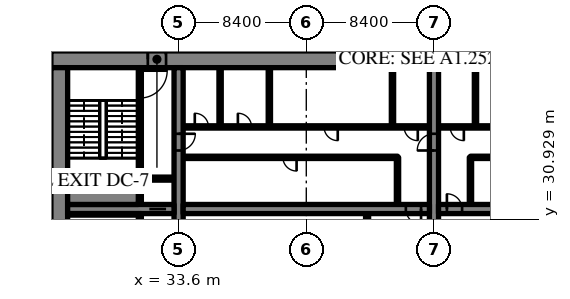
"""IFC4 building model, lengths in metres.
Left out: names, types, materials, properties, quantities, classifications, styles, units other than length and angle.
Written with IfcOpenShell. Run it as: python <this file> out.ifc"""

import sys

from ifc_helpers import new_model, si_unit, direction, frame, frame_2d, origin, place, context, subcontext, project, spatial, rectangle, extrude, source, transform, mapped, element, fill, save


model = new_model("IFC4")
c1 = context("Model", 3, precision=1e-05, world=origin(), true_north=direction((0.0, 1.0)))
c2 = subcontext(c1, "Body", "Model", "MODEL_VIEW")
j1 = project(units=[si_unit("LENGTHUNIT", "METRE"), si_unit("PLANEANGLEUNIT", "RADIAN")], contexts=[c1])
p1 = place(None, origin())
s1 = spatial("IfcSite", under=j1, at=p1, CompositionType="ELEMENT")
p2 = place(p1, origin())
s2 = spatial("IfcBuilding", under=s1, at=p2, CompositionType="ELEMENT")
p3 = place(p2, origin())
s3 = spatial("IfcBuildingStorey", under=s2, at=p3, CompositionType="ELEMENT", Elevation=0.0)
m1 = source(origin(), c2, "Body", "SweptSolid", [
    extrude(rectangle(XDim=50.4, YDim=1.1, at=frame_2d((25.2, 0.0))), origin(), (0.0, 0.0, 1.0), 5.72),
])
p4 = place(p3, frame((25.2, 41.45, 0.0), z_axis=(0.0, 0.0, 1.0), x_axis=(1.0, 0.0, 0.0)))
e1 = element("IfcWall", 1, at=p4, inside=s3, PredefinedType="SHEAR", context=c2, shape_type="MappedRepresentation", body=[
    mapped(m1, transform((0.0, 0.0, 0.0), scale=1.0)),
])
m2 = source(origin(), c2, "Body", "SweptSolid", [
    extrude(rectangle(XDim=1.2, YDim=2.1, at=frame_2d((0.6, 1.05))), frame((0.0, 0.56, 0.0), z_axis=(0.0, -1.0, 0.0), x_axis=(1.0, 0.0, 0.0)), (0.0, 0.0, 1.0), 1.12),
])
p5 = place(p4, frame((6.375, 0.0, 0.0)))
e2 = element("IfcOpeningElement", 2, at=p5, cuts=e1, PredefinedType="OPENING", context=c2, shape_type="MappedRepresentation", body=[
    mapped(m2, transform((0.0, 0.0, 0.0), scale=1.0)),
])
p6 = place(p4, frame((47.625, 0.0, 0.0)))
e3 = element("IfcOpeningElement", 3, at=p6, cuts=e1, PredefinedType="OPENING", context=c2, shape_type="MappedRepresentation", body=[
    mapped(m2, transform((0.0, 0.0, 0.0), scale=1.0)),
])
m3 = source(origin(), c2, "Body", "SweptSolid", [
    extrude(rectangle(XDim=17.8, YDim=1.1, at=frame_2d((8.9, 0.0))), origin(), (0.0, 0.0, 1.0), 5.72),
])
p7 = place(p3, frame((25.75, 23.1, 0.0), z_axis=(0.0, 0.0, 1.0), x_axis=(0.0, 1.0, 0.0)))
e4 = element("IfcWall", 4, at=p7, inside=s3, PredefinedType="SHEAR", context=c2, shape_type="MappedRepresentation", body=[
    mapped(m3, transform((0.0, 0.0, 0.0), scale=1.0)),
])
m4 = source(origin(), c2, "Body", "SweptSolid", [
    extrude(rectangle(XDim=17.8, YDim=0.6, at=frame_2d((8.9, 0.0))), origin(), (0.0, 0.0, 1.0), 5.72),
])
p8 = place(p3, frame((33.6, 23.1, 0.0), z_axis=(0.0, 0.0, 1.0), x_axis=(0.0, 1.0, 0.0)))
e5 = element("IfcWall", 5, at=p8, inside=s3, PredefinedType="SHEAR", context=c2, shape_type="MappedRepresentation", body=[
    mapped(m4, transform((0.0, 0.0, 0.0), scale=1.0)),
])
m5 = source(origin(), c2, "Body", "SweptSolid", [
    extrude(rectangle(XDim=1.1, YDim=2.1, at=frame_2d((0.55, 1.05))), frame((0.0, 0.31, 0.0), z_axis=(0.0, -1.0, 0.0), x_axis=(1.0, 0.0, 0.0)), (0.0, 0.0, 1.0), 0.62),
])
p9 = place(p8, frame((12.35, 0.0, 0.0)))
e6 = element("IfcOpeningElement", 6, at=p9, cuts=e5, PredefinedType="OPENING", context=c2, shape_type="MappedRepresentation", body=[
    mapped(m5, transform((0.0, 0.0, 0.0), scale=1.0)),
])
p10 = place(p3, frame((50.4, 23.1, 0.0), z_axis=(0.0, 0.0, 1.0), x_axis=(0.0, 1.0, 0.0)))
e7 = element("IfcWall", 7, at=p10, inside=s3, PredefinedType="SHEAR", context=c2, shape_type="MappedRepresentation", body=[
    mapped(m4, transform((0.0, 0.0, 0.0), scale=1.0)),
])
p11 = place(p10, frame((12.35, 0.0, 0.0)))
e8 = element("IfcOpeningElement", 8, at=p11, cuts=e7, PredefinedType="OPENING", context=c2, shape_type="MappedRepresentation", body=[
    mapped(m5, transform((0.0, 0.0, 0.0), scale=1.0)),
])
m6 = source(origin(), c2, "Body", "SweptSolid", [
    extrude(rectangle(XDim=7.0, YDim=0.6, at=frame_2d((3.5, 0.0))), origin(), (0.0, 0.0, 1.0), 5.72),
])
p12 = place(p3, frame((26.3, 31.6, 0.0), z_axis=(0.0, 0.0, 1.0), x_axis=(1.0, 0.0, 0.0)))
e9 = element("IfcWall", 9, at=p12, inside=s3, PredefinedType="SHEAR", context=c2, shape_type="MappedRepresentation", body=[
    mapped(m6, transform((0.0, 0.0, 0.0), scale=1.0)),
])
p13 = place(p12, frame((5.375, 0.0, 0.0)))
e10 = element("IfcOpeningElement", 10, at=p13, cuts=e9, PredefinedType="OPENING", context=c2, shape_type="MappedRepresentation", body=[
    mapped(m5, transform((0.0, 0.0, 0.0), scale=1.0)),
])
m7 = source(origin(), c2, "Body", "SweptSolid", [
    extrude(rectangle(XDim=16.2, YDim=0.6, at=frame_2d((8.1, 0.0))), origin(), (0.0, 0.0, 1.0), 5.72),
])
p14 = place(p3, frame((33.9, 31.6, 0.0), z_axis=(0.0, 0.0, 1.0), x_axis=(1.0, 0.0, 0.0)))
e11 = element("IfcWall", 11, at=p14, inside=s3, PredefinedType="SHEAR", context=c2, shape_type="MappedRepresentation", body=[
    mapped(m7, transform((0.0, 0.0, 0.0), scale=1.0)),
])
m8 = source(origin(), c2, "Body", "SweptSolid", [
    extrude(rectangle(XDim=1.0, YDim=2.1, at=frame_2d((0.5, 1.05))), frame((0.0, 0.31, 0.0), z_axis=(0.0, -1.0, 0.0), x_axis=(1.0, 0.0, 0.0)), (0.0, 0.0, 1.0), 0.62),
])
p15 = place(p14, frame((14.65, 0.0, 0.0)))
e12 = element("IfcOpeningElement", 12, at=p15, cuts=e11, PredefinedType="OPENING", context=c2, shape_type="MappedRepresentation", body=[
    mapped(m8, transform((0.0, 0.0, 0.0), scale=1.0)),
])
m9 = source(origin(), c2, "Body", "SweptSolid", [
    extrude(rectangle(XDim=16.2, YDim=0.6, at=frame_2d((8.1, 0.0))), origin(), (0.0, 0.0, 1.0), 5.72),
])
p16 = place(p3, frame((50.7, 31.6, 0.0), z_axis=(0.0, 0.0, 1.0), x_axis=(1.0, 0.0, 0.0)))
e13 = element("IfcWall", 13, at=p16, inside=s3, PredefinedType="SHEAR", context=c2, shape_type="MappedRepresentation", body=[
    mapped(m9, transform((0.0, 0.0, 0.0), scale=1.0)),
])
p17 = place(p16, frame((0.55, 0.0, 0.0)))
e14 = element("IfcOpeningElement", 14, at=p17, cuts=e13, PredefinedType="OPENING", context=c2, shape_type="MappedRepresentation", body=[
    mapped(m8, transform((0.0, 0.0, 0.0), scale=1.0)),
])
m10 = source(origin(), c2, "Body", "SweptSolid", [
    extrude(rectangle(XDim=2.5, YDim=0.2, at=frame_2d((1.25, 0.0))), origin(), (0.0, 0.0, 1.0), 5.72),
])
p18 = place(p3, frame((46.0, 28.8, 0.0), z_axis=(0.0, 0.0, 1.0), x_axis=(0.0, 1.0, 0.0)))
e15 = element("IfcWall", 15, at=p18, inside=s3, PredefinedType="SOLIDWALL", context=c2, shape_type="MappedRepresentation", body=[
    mapped(m10, transform((0.0, 0.0, 0.0), scale=1.0)),
])
m11 = source(origin(), c2, "Body", "SweptSolid", [
    extrude(rectangle(XDim=3.1, YDim=0.15, at=frame_2d((1.55, 0.0))), origin(), (0.0, 0.0, 1.0), 5.72),
])
p19 = place(p3, frame((48.0, 31.9, 0.0), z_axis=(0.0, 0.0, 1.0), x_axis=(0.0, 1.0, 0.0)))
e16 = element("IfcWall", 16, at=p19, inside=s3, PredefinedType="PARTITIONING", context=c2, shape_type="MappedRepresentation", body=[
    mapped(m11, transform((0.0, 0.0, 0.0), scale=1.0)),
])
m12 = source(origin(), c2, "Body", "SweptSolid", [
    extrude(rectangle(XDim=14.1, YDim=0.15, at=frame_2d((7.05, 0.0))), origin(), (0.0, 0.0, 1.0), 5.72),
])
p20 = place(p3, frame((33.9, 35.0, 0.0), z_axis=(0.0, 0.0, 1.0), x_axis=(1.0, 0.0, 0.0)))
e17 = element("IfcWall", 17, at=p20, inside=s3, PredefinedType="PARTITIONING", context=c2, shape_type="MappedRepresentation", body=[
    mapped(m12, transform((0.0, 0.0, 0.0), scale=1.0)),
])
m13 = source(origin(), c2, "Body", "SweptSolid", [
    extrude(rectangle(XDim=0.9, YDim=2.1, at=frame_2d((0.45, 1.05))), frame((0.0, 0.085, 0.0), z_axis=(0.0, -1.0, 0.0), x_axis=(1.0, 0.0, 0.0)), (0.0, 0.0, 1.0), 0.17),
])
p21 = place(p20, frame((6.562, 0.0, 0.0)))
e18 = element("IfcOpeningElement", 18, at=p21, cuts=e17, PredefinedType="OPENING", context=c2, shape_type="MappedRepresentation", body=[
    mapped(m13, transform((0.0, 0.0, 0.0), scale=1.0)),
])
m14 = source(origin(), c2, "Body", "SweptSolid", [
    extrude(rectangle(XDim=16.2, YDim=0.15, at=frame_2d((8.1, 0.0))), origin(), (0.0, 0.0, 1.0), 5.72),
])
p22 = place(p3, frame((33.9, 37.0, 0.0), z_axis=(0.0, 0.0, 1.0), x_axis=(1.0, 0.0, 0.0)))
e19 = element("IfcWall", 19, at=p22, inside=s3, PredefinedType="PARTITIONING", context=c2, shape_type="MappedRepresentation", body=[
    mapped(m14, transform((0.0, 0.0, 0.0), scale=1.0)),
])
p23 = place(p22, frame((0.765, 0.0, 0.0)))
e20 = element("IfcOpeningElement", 20, at=p23, cuts=e19, PredefinedType="OPENING", context=c2, shape_type="MappedRepresentation", body=[
    mapped(m13, transform((0.0, 0.0, 0.0), scale=1.0)),
])
p24 = place(p22, frame((3.6, 0.0, 0.0)))
e21 = element("IfcOpeningElement", 21, at=p24, cuts=e19, PredefinedType="OPENING", context=c2, shape_type="MappedRepresentation", body=[
    mapped(m13, transform((0.0, 0.0, 0.0), scale=1.0)),
])
p25 = place(p22, frame((9.27, 0.0, 0.0)))
e22 = element("IfcOpeningElement", 22, at=p25, cuts=e19, PredefinedType="OPENING", context=c2, shape_type="MappedRepresentation", body=[
    mapped(m13, transform((0.0, 0.0, 0.0), scale=1.0)),
])
p26 = place(p22, frame((14.535, 0.0, 0.0)))
e23 = element("IfcOpeningElement", 23, at=p26, cuts=e19, PredefinedType="OPENING", context=c2, shape_type="MappedRepresentation", body=[
    mapped(m13, transform((0.0, 0.0, 0.0), scale=1.0)),
])
m15 = source(origin(), c2, "Body", "SweptSolid", [
    extrude(rectangle(XDim=3.9, YDim=0.15, at=frame_2d((1.95, 0.0))), origin(), (0.0, 0.0, 1.0), 5.72),
])
for number, where, z_axis, x_axis in (
    (24, (36.33, 37.0, 0.0), (0.0, 0.0, 1.0), (0.0, 1.0, 0.0)),
    (25, (39.57, 37.0, 0.0), (0.0, 0.0, 1.0), (0.0, 1.0, 0.0)),
    (26, (47.67, 37.0, 0.0), (0.0, 0.0, 1.0), (0.0, 1.0, 0.0)),
):
    element("IfcWall", number, at=place(p3, frame(where, z_axis=z_axis, x_axis=x_axis)), inside=s3, PredefinedType="PARTITIONING", context=c2, shape_type="MappedRepresentation", body=[
        mapped(m15, transform((0.0, 0.0, 0.0), scale=1.0)),
    ])
p27 = place(p3, frame((52.8, 31.9, 0.0), z_axis=(0.0, 0.0, 1.0), x_axis=(0.0, 1.0, 0.0)))
e27 = element("IfcWall", 27, at=p27, inside=s3, PredefinedType="PARTITIONING", context=c2, shape_type="MappedRepresentation", body=[
    mapped(m11, transform((0.0, 0.0, 0.0), scale=1.0)),
])
m16 = source(origin(), c2, "Body", "SweptSolid", [
    extrude(rectangle(XDim=14.1, YDim=0.15, at=frame_2d((7.05, 0.0))), origin(), (0.0, 0.0, 1.0), 5.72),
])
p28 = place(p3, frame((66.9, 35.0, 0.0), z_axis=(0.0, 0.0, 1.0), x_axis=(-1.0, 0.0, 0.0)))
e28 = element("IfcWall", 28, at=p28, inside=s3, PredefinedType="PARTITIONING", context=c2, shape_type="MappedRepresentation", body=[
    mapped(m16, transform((0.0, 0.0, 0.0), scale=1.0)),
])
p29 = place(p28, frame((3.407, 0.0, 0.0)))
e29 = element("IfcOpeningElement", 29, at=p29, cuts=e28, PredefinedType="OPENING", context=c2, shape_type="MappedRepresentation", body=[
    mapped(m13, transform((0.0, 0.0, 0.0), scale=1.0)),
])
p30 = place(p28, frame((10.419, 0.0, 0.0)))
e30 = element("IfcOpeningElement", 30, at=p30, cuts=e28, PredefinedType="OPENING", context=c2, shape_type="MappedRepresentation", body=[
    mapped(m13, transform((0.0, 0.0, 0.0), scale=1.0)),
])
m17 = source(origin(), c2, "Body", "SweptSolid", [
    extrude(rectangle(XDim=16.2, YDim=0.15, at=frame_2d((8.1, 0.0))), origin(), (0.0, 0.0, 1.0), 5.72),
])
p31 = place(p3, frame((66.9, 37.0, 0.0), z_axis=(0.0, 0.0, 1.0), x_axis=(-1.0, 0.0, 0.0)))
e31 = element("IfcWall", 31, at=p31, inside=s3, PredefinedType="PARTITIONING", context=c2, shape_type="MappedRepresentation", body=[
    mapped(m17, transform((0.0, 0.0, 0.0), scale=1.0)),
])
p32 = place(p31, frame((6.435, 0.0, 0.0)))
e32 = element("IfcOpeningElement", 32, at=p32, cuts=e31, PredefinedType="OPENING", context=c2, shape_type="MappedRepresentation", body=[
    mapped(m13, transform((0.0, 0.0, 0.0), scale=1.0)),
])
p33 = place(p31, frame((14.535, 0.0, 0.0)))
e33 = element("IfcOpeningElement", 33, at=p33, cuts=e31, PredefinedType="OPENING", context=c2, shape_type="MappedRepresentation", body=[
    mapped(m13, transform((0.0, 0.0, 0.0), scale=1.0)),
])
p34 = place(p3, frame((53.13, 37.0, 0.0), z_axis=(0.0, 0.0, 1.0), x_axis=(0.0, 1.0, 0.0)))
e34 = element("IfcWall", 34, at=p34, inside=s3, PredefinedType="PARTITIONING", context=c2, shape_type="MappedRepresentation", body=[
    mapped(m15, transform((0.0, 0.0, 0.0), scale=1.0)),
])
m18 = source(origin(), c2, "Body", "SweptSolid", [
    extrude(rectangle(XDim=8.2, YDim=0.2, at=frame_2d((4.1, 0.0))), origin(), (0.0, 0.0, 1.0), 5.72),
])
p35 = place(p3, frame((31.05, 23.1, 0.0), z_axis=(0.0, 0.0, 1.0), x_axis=(0.0, 1.0, 0.0)))
e35 = element("IfcWall", 35, at=p35, inside=s3, PredefinedType="SOLIDWALL", context=c2, shape_type="MappedRepresentation", body=[
    mapped(m18, transform((0.0, 0.0, 0.0), scale=1.0)),
])
m19 = source(origin(), c2, "Body", "SweptSolid", [
    extrude(rectangle(XDim=1.2, YDim=2.1, at=frame_2d((0.6, 1.05))), frame((0.0, 0.11, 0.0), z_axis=(0.0, -1.0, 0.0), x_axis=(1.0, 0.0, 0.0)), (0.0, 0.0, 1.0), 0.22),
])
p36 = place(p35, frame((6.4, 0.0, 0.0)))
e36 = element("IfcOpeningElement", 36, at=p36, cuts=e35, PredefinedType="OPENING", context=c2, shape_type="MappedRepresentation", body=[
    mapped(m19, transform((0.0, 0.0, 0.0), scale=1.0)),
])
m20 = source(origin(), c2, "Body", "SweptSolid", [
    extrude(rectangle(XDim=1.7, YDim=0.2, at=frame_2d((0.85, 0.0))), origin(), (0.0, 0.0, 1.0), 5.72),
])
p37 = place(p3, frame((31.05, 31.9, 0.0), z_axis=(0.0, 0.0, 1.0), x_axis=(0.0, 1.0, 0.0)))
e37 = element("IfcWall", 37, at=p37, inside=s3, PredefinedType="SOLIDWALL", context=c2, shape_type="MappedRepresentation", body=[
    mapped(m20, transform((0.0, 0.0, 0.0), scale=1.0)),
])
m21 = source(origin(), c2, "Body", "SweptSolid", [
    extrude(rectangle(XDim=2.15, YDim=0.2, at=frame_2d((1.075, 0.0))), origin(), (0.0, 0.0, 1.0), 5.72),
])
p38 = place(p3, frame((31.15, 33.6, 0.0), z_axis=(0.0, 0.0, 1.0), x_axis=(1.0, 0.0, 0.0)))
e38 = element("IfcWall", 38, at=p38, inside=s3, PredefinedType="SOLIDWALL", context=c2, shape_type="MappedRepresentation", body=[
    mapped(m21, transform((0.0, 0.0, 0.0), scale=1.0)),
])
m22 = source(origin(), c2, "Body", "SweptSolid", [
    extrude(rectangle(XDim=7.3, YDim=0.2, at=frame_2d((3.65, 0.0))), origin(), (0.0, 0.0, 1.0), 5.72),
])
p39 = place(p3, frame((31.05, 33.6, 0.0), z_axis=(0.0, 0.0, 1.0), x_axis=(0.0, 1.0, 0.0)))
e39 = element("IfcWall", 39, at=p39, inside=s3, PredefinedType="SOLIDWALL", context=c2, shape_type="MappedRepresentation", body=[
    mapped(m22, transform((0.0, 0.0, 0.0), scale=1.0)),
])
m23 = source(origin(), c2, "Body", "SweptSolid", [
    extrude(rectangle(XDim=1.8, YDim=2.1, at=frame_2d((0.9, 1.05))), frame((0.0, 0.11, 0.0), z_axis=(0.0, -1.0, 0.0), x_axis=(1.0, 0.0, 0.0)), (0.0, 0.0, 1.0), 0.22),
])
p40 = place(p39, frame((5.3, 0.0, 0.0)))
e40 = element("IfcOpeningElement", 40, at=p40, cuts=e39, PredefinedType="OPENING", context=c2, shape_type="MappedRepresentation", body=[
    mapped(m23, transform((0.0, 0.0, 0.0), scale=1.0)),
])
m24 = source(origin(), c2, "Body", "SweptSolid", [
    extrude(rectangle(XDim=4.65, YDim=0.1, at=frame_2d((2.325, 0.0))), origin(), (0.0, 0.0, 1.0), 5.72),
])
p41 = place(p3, frame((26.3, 31.25, 0.0), z_axis=(0.0, 0.0, 1.0), x_axis=(1.0, 0.0, 0.0)))
e41 = element("IfcWall", 41, at=p41, inside=s3, PredefinedType="SOLIDWALL", context=c2, shape_type="MappedRepresentation", body=[
    mapped(m24, transform((0.0, 0.0, 0.0), scale=1.0)),
])
m25 = source(origin(), c2, "Body", "SweptSolid", [
    extrude(rectangle(XDim=4.65, YDim=0.9, at=frame_2d((2.325, 0.0))), origin(), (0.0, 0.0, 1.0), 5.72),
])
p42 = place(p3, frame((26.3, 32.35, 0.0), z_axis=(0.0, 0.0, 1.0), x_axis=(1.0, 0.0, 0.0)))
e42 = element("IfcWall", 42, at=p42, inside=s3, PredefinedType="SOLIDWALL", context=c2, shape_type="MappedRepresentation", body=[
    mapped(m25, transform((0.0, 0.0, 0.0), scale=1.0)),
])
m26 = source(origin(), c2, "Body", "SweptSolid", [
    extrude(rectangle(XDim=1.0, YDim=2.1, at=frame_2d((0.5, 1.05))), frame((0.0, 0.025, 0.0), z_axis=(0.0, -1.0, 0.0), x_axis=(1.0, 0.0, 0.0)), (0.0, 0.0, 1.0), 0.05),
])
p43 = place(p15, origin())
e43 = element("IfcDoor", 43, at=p43, inside=s3, OperationType="SINGLE_SWING_RIGHT", PredefinedType="DOOR", context=c2, shape_type="MappedRepresentation", body=[
    mapped(m26, transform((0.0, 0.0, 0.0), scale=1.0)),
])
fill(e12, e43)
m27 = source(origin(), c2, "Body", "SweptSolid", [
    extrude(rectangle(XDim=0.9, YDim=2.1, at=frame_2d((0.45, 1.05))), frame((0.0, 0.025, 0.0), z_axis=(0.0, -1.0, 0.0), x_axis=(1.0, 0.0, 0.0)), (0.0, 0.0, 1.0), 0.05),
])
p44 = place(p21, origin())
e44 = element("IfcDoor", 44, at=p44, inside=s3, OperationType="SINGLE_SWING_RIGHT", PredefinedType="DOOR", context=c2, shape_type="MappedRepresentation", body=[
    mapped(m27, transform((0.0, 0.0, 0.0), scale=1.0)),
])
fill(e18, e44)
p45 = place(p23, origin())
e45 = element("IfcDoor", 45, at=p45, inside=s3, OperationType="SINGLE_SWING_LEFT", PredefinedType="DOOR", context=c2, shape_type="MappedRepresentation", body=[
    mapped(m27, transform((0.0, 0.0, 0.0), scale=1.0)),
])
fill(e20, e45)
p46 = place(p24, origin())
e46 = element("IfcDoor", 46, at=p46, inside=s3, OperationType="SINGLE_SWING_LEFT", PredefinedType="DOOR", context=c2, shape_type="MappedRepresentation", body=[
    mapped(m27, transform((0.0, 0.0, 0.0), scale=1.0)),
])
fill(e21, e46)
p47 = place(p25, origin())
e47 = element("IfcDoor", 47, at=p47, inside=s3, OperationType="SINGLE_SWING_RIGHT", PredefinedType="DOOR", context=c2, shape_type="MappedRepresentation", body=[
    mapped(m27, transform((0.0, 0.0, 0.0), scale=1.0)),
])
fill(e22, e47)
p48 = place(p26, origin())
e48 = element("IfcDoor", 48, at=p48, inside=s3, OperationType="SINGLE_SWING_RIGHT", PredefinedType="DOOR", context=c2, shape_type="MappedRepresentation", body=[
    mapped(m27, transform((0.0, 0.0, 0.0), scale=1.0)),
])
fill(e23, e48)
p49 = place(p17, origin())
e49 = element("IfcDoor", 49, at=p49, inside=s3, OperationType="SINGLE_SWING_LEFT", PredefinedType="DOOR", context=c2, shape_type="MappedRepresentation", body=[
    mapped(m26, transform((0.0, 0.0, 0.0), scale=1.0)),
])
fill(e14, e49)
p50 = place(p33, origin())
e50 = element("IfcDoor", 50, at=p50, inside=s3, OperationType="SINGLE_SWING_LEFT", PredefinedType="DOOR", context=c2, shape_type="MappedRepresentation", body=[
    mapped(m27, transform((0.0, 0.0, 0.0), scale=1.0)),
])
fill(e33, e50)
m28 = source(origin(), c2, "Body", "SweptSolid", [
    extrude(rectangle(XDim=1.1, YDim=2.1, at=frame_2d((0.55, 1.05))), frame((0.0, 0.025, 0.0), z_axis=(0.0, -1.0, 0.0), x_axis=(1.0, 0.0, 0.0)), (0.0, 0.0, 1.0), 0.05),
])
p51 = place(p13, origin())
e51 = element("IfcDoor", 51, at=p51, inside=s3, OperationType="SLIDING_TO_LEFT", PredefinedType="DOOR", context=c2, shape_type="MappedRepresentation", body=[
    mapped(m28, transform((0.0, 0.0, 0.0), scale=1.0)),
])
fill(e10, e51)
m29 = source(origin(), c2, "Body", "SweptSolid", [
    extrude(rectangle(XDim=1.8, YDim=2.1, at=frame_2d((0.9, 1.05))), frame((0.0, 0.025, 0.0), z_axis=(0.0, -1.0, 0.0), x_axis=(1.0, 0.0, 0.0)), (0.0, 0.0, 1.0), 0.05),
])
p52 = place(p40, origin())
e52 = element("IfcDoor", 52, at=p52, inside=s3, OperationType="SINGLE_SWING_RIGHT", PredefinedType="DOOR", context=c2, shape_type="MappedRepresentation", body=[
    mapped(m29, transform((0.0, 0.0, 0.0), scale=1.0)),
])
fill(e40, e52)
m30 = source(origin(), c2, "Body", "SweptSolid", [
    extrude(rectangle(XDim=1.2, YDim=2.1, at=frame_2d((0.6, 1.05))), frame((0.0, 0.025, 0.0), z_axis=(0.0, -1.0, 0.0), x_axis=(1.0, 0.0, 0.0)), (0.0, 0.0, 1.0), 0.05),
])
p53 = place(p5, origin())
e53 = element("IfcDoor", 53, at=p53, inside=s3, OperationType="SINGLE_SWING_LEFT", PredefinedType="DOOR", context=c2, shape_type="MappedRepresentation", body=[
    mapped(m30, transform((0.0, 0.0, 0.0), scale=1.0)),
])
fill(e2, e53)
p54 = place(p9, origin())
e54 = element("IfcDoor", 54, at=p54, inside=s3, OperationType="SINGLE_SWING_RIGHT", PredefinedType="DOOR", context=c2, shape_type="MappedRepresentation", body=[
    mapped(m28, transform((0.0, 0.0, 0.0), scale=1.0)),
])
fill(e6, e54)
p55 = place(p11, origin())
e55 = element("IfcDoor", 55, at=p55, inside=s3, OperationType="SINGLE_SWING_LEFT", PredefinedType="DOOR", context=c2, shape_type="MappedRepresentation", body=[
    mapped(m28, transform((0.0, 0.0, 0.0), scale=1.0)),
])
fill(e8, e55)
save(model, sys.argv[1])
